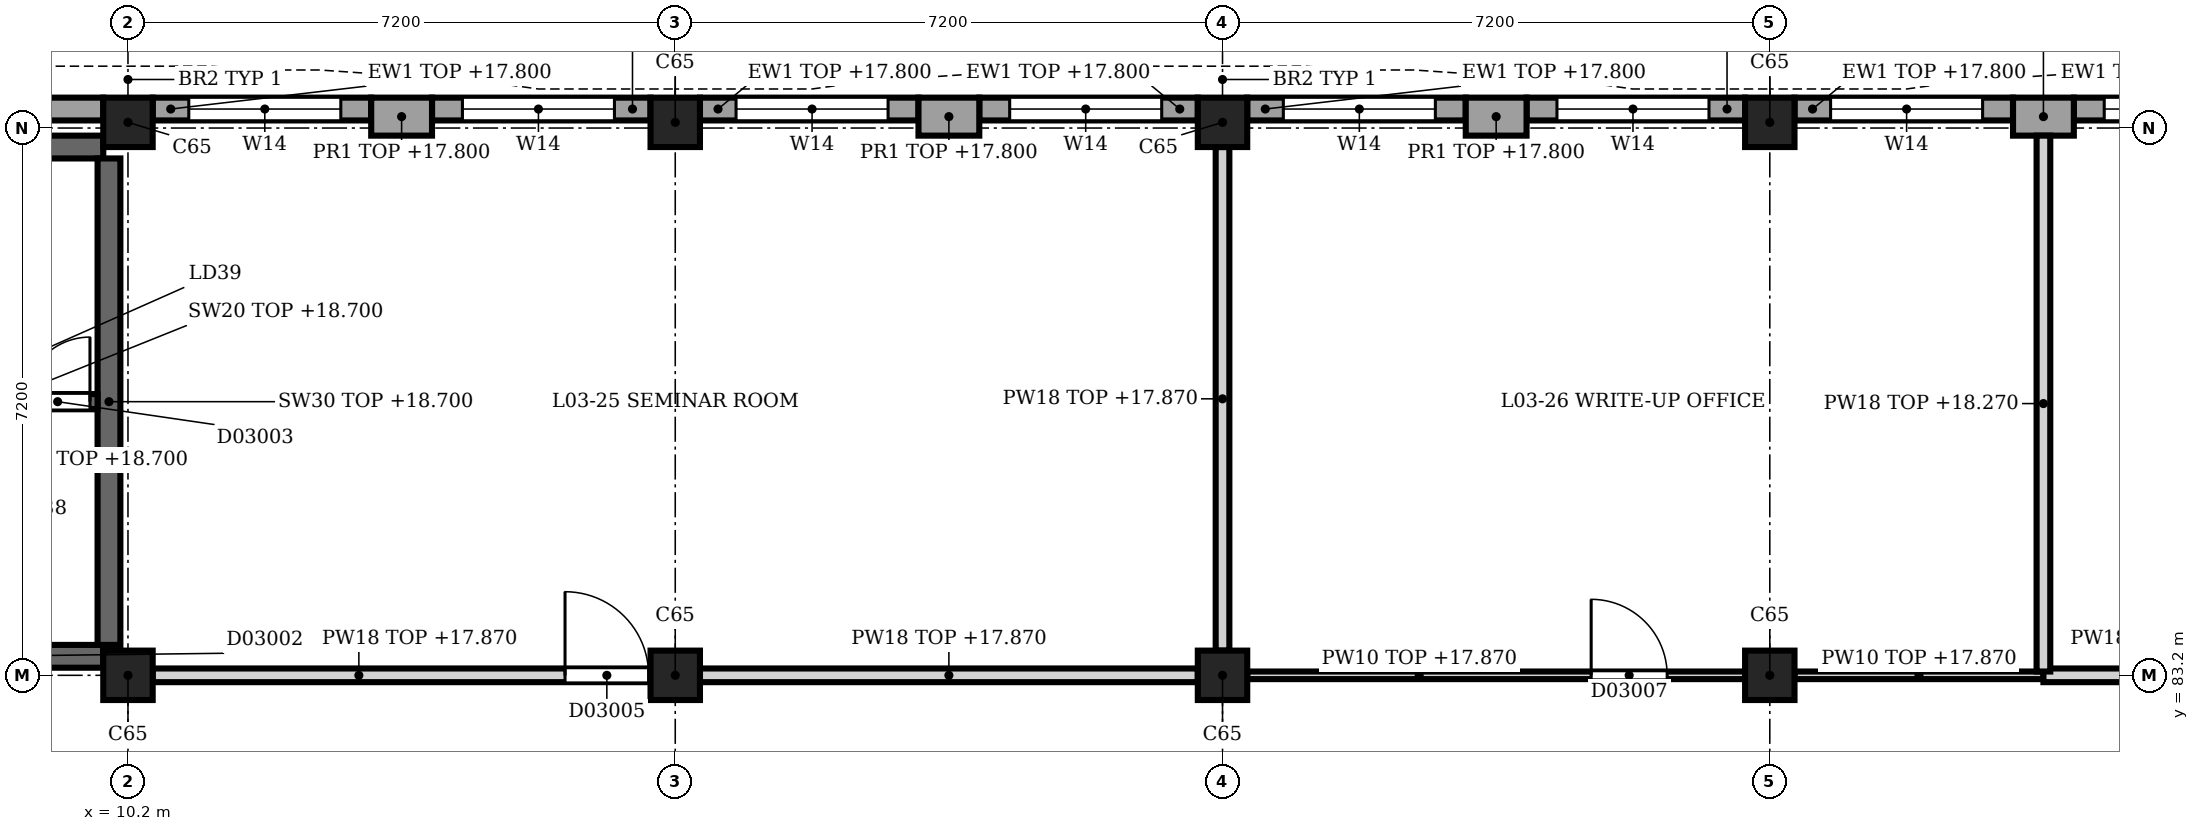
"""IFC4 building model, lengths in metres.
Left out: names, types, materials, properties, quantities, classifications, styles, units other than length and angle.
Written with IfcOpenShell. Run it as: python <this file> out.ifc"""

import sys

from ifc_helpers import new_model, si_unit, direction, frame, frame_2d, origin, origin_2d, place, context, subcontext, project, spatial, rectangle, extrude, element, fill, save


model = new_model("IFC4")
c1 = context("Model", 3, precision=1e-05, world=origin(), true_north=direction((0.0, 1.0)))
c2 = subcontext(c1, "Body", "Model", "MODEL_VIEW")
j1 = project(units=[si_unit("LENGTHUNIT", "METRE"), si_unit("PLANEANGLEUNIT", "RADIAN")], contexts=[c1])
p1 = place(None, origin())
s1 = spatial("IfcSite", under=j1, at=p1, CompositionType="ELEMENT")
p2 = place(p1, origin())
s2 = spatial("IfcBuilding", under=s1, at=p2, CompositionType="ELEMENT")
p3 = place(p2, frame((0.0, 0.0, 14.4)))
s3 = spatial("IfcBuildingStorey", under=s2, at=p3, CompositionType="ELEMENT", Elevation=14.4)
for number, where, z_axis, x_axis in (
    (1, (10.2, 83.2, 0.0), (0.0, 0.0, 1.0), (1.0, 0.0, 0.0)),
    (2, (10.2, 90.475, 0.0), (0.0, 0.0, 1.0), (1.0, 0.0, 0.0)),
    (3, (17.4, 83.2, 0.0), (0.0, 0.0, 1.0), (1.0, 0.0, 0.0)),
    (4, (17.4, 90.475, 0.0), (0.0, 0.0, 1.0), (1.0, 0.0, 0.0)),
    (5, (24.6, 83.2, 0.0), (0.0, 0.0, 1.0), (1.0, 0.0, 0.0)),
    (6, (24.6, 90.475, 0.0), (0.0, 0.0, 1.0), (1.0, 0.0, 0.0)),
    (7, (31.8, 83.2, 0.0), (0.0, 0.0, 1.0), (1.0, 0.0, 0.0)),
    (8, (31.8, 90.475, 0.0), (0.0, 0.0, 1.0), (1.0, 0.0, 0.0)),
):
    element("IfcColumn", number, at=place(p3, frame(where, z_axis=z_axis, x_axis=x_axis)), inside=s3, PredefinedType="COLUMN", context=c2, shape_type="SweptSolid", body=[
        extrude(rectangle(XDim=0.65, YDim=0.65, at=origin_2d()), origin(), (0.0, 0.0, 1.0), 4.5),
    ])
p4 = place(p3, frame((13.4, 90.55, 0.0), z_axis=(0.0, 0.0, 1.0), x_axis=(1.0, 0.0, 0.0)))
e9 = element("IfcWall", 9, at=p4, inside=s3, PredefinedType="SOLIDWALL", context=c2, shape_type="SweptSolid", body=[
    extrude(rectangle(XDim=0.8, YDim=0.5, at=frame_2d((0.4, 0.0))), origin(), (0.0, 0.0, 1.0), 3.4),
])
p5 = place(p3, frame((20.6, 90.55, 0.0), z_axis=(0.0, 0.0, 1.0), x_axis=(1.0, 0.0, 0.0)))
e10 = element("IfcWall", 10, at=p5, inside=s3, PredefinedType="SOLIDWALL", context=c2, shape_type="SweptSolid", body=[
    extrude(rectangle(XDim=0.8, YDim=0.5, at=frame_2d((0.4, 0.0))), origin(), (0.0, 0.0, 1.0), 3.4),
])
for number, where, z_axis, x_axis in (
    (11, (27.8, 90.55, 0.0), (0.0, 0.0, 1.0), (1.0, 0.0, 0.0)),
    (12, (35.0, 90.55, 0.0), (0.0, 0.0, 1.0), (1.0, 0.0, 0.0)),
):
    element("IfcWall", number, at=place(p3, frame(where, z_axis=z_axis, x_axis=x_axis)), inside=s3, PredefinedType="SOLIDWALL", context=c2, shape_type="SweptSolid", body=[
        extrude(rectangle(XDim=0.8, YDim=0.5, at=frame_2d((0.4, 0.0))), origin(), (0.0, 0.0, 1.0), 3.4),
    ])
p6 = place(p3, frame((7.0, 90.65, 0.0), z_axis=(0.0, 0.0, 1.0), x_axis=(1.0, 0.0, 0.0)))
e13 = element("IfcWall", 13, at=p6, inside=s3, PredefinedType="SOLIDWALL", context=c2, shape_type="SweptSolid", body=[
    extrude(rectangle(XDim=2.875, YDim=0.3, at=frame_2d((1.438, 0.0))), origin(), (0.0, 0.0, 1.0), 3.4),
])
p7 = place(p3, frame((10.525, 90.65, 0.0), z_axis=(0.0, 0.0, 1.0), x_axis=(1.0, 0.0, 0.0)))
e14 = element("IfcWall", 14, at=p7, inside=s3, PredefinedType="SOLIDWALL", context=c2, shape_type="SweptSolid", body=[
    extrude(rectangle(XDim=2.875, YDim=0.3, at=frame_2d((1.438, 0.0))), origin(), (0.0, 0.0, 1.0), 3.4),
])
p8 = place(p7, frame((0.475, 0.0, 0.9)))
e15 = element("IfcOpeningElement", 15, at=p8, cuts=e14, PredefinedType="OPENING", context=c2, shape_type="SweptSolid", body=[
    extrude(rectangle(XDim=2.0, YDim=2.4, at=frame_2d((1.0, 1.2))), frame((0.0, 0.16, 0.0), z_axis=(0.0, -1.0, 0.0), x_axis=(1.0, 0.0, 0.0)), (0.0, 0.0, 1.0), 0.32),
])
p9 = place(p3, frame((14.2, 90.65, 0.0), z_axis=(0.0, 0.0, 1.0), x_axis=(1.0, 0.0, 0.0)))
e16 = element("IfcWall", 16, at=p9, inside=s3, PredefinedType="SOLIDWALL", context=c2, shape_type="SweptSolid", body=[
    extrude(rectangle(XDim=2.875, YDim=0.3, at=frame_2d((1.438, 0.0))), origin(), (0.0, 0.0, 1.0), 3.4),
])
p10 = place(p9, frame((0.4, 0.0, 0.9)))
e17 = element("IfcOpeningElement", 17, at=p10, cuts=e16, PredefinedType="OPENING", context=c2, shape_type="SweptSolid", body=[
    extrude(rectangle(XDim=2.0, YDim=2.4, at=frame_2d((1.0, 1.2))), frame((0.0, 0.16, 0.0), z_axis=(0.0, -1.0, 0.0), x_axis=(1.0, 0.0, 0.0)), (0.0, 0.0, 1.0), 0.32),
])
p11 = place(p3, frame((17.725, 90.65, 0.0), z_axis=(0.0, 0.0, 1.0), x_axis=(1.0, 0.0, 0.0)))
e18 = element("IfcWall", 18, at=p11, inside=s3, PredefinedType="SOLIDWALL", context=c2, shape_type="SweptSolid", body=[
    extrude(rectangle(XDim=2.875, YDim=0.3, at=frame_2d((1.438, 0.0))), origin(), (0.0, 0.0, 1.0), 3.4),
])
p12 = place(p11, frame((0.475, 0.0, 0.9)))
e19 = element("IfcOpeningElement", 19, at=p12, cuts=e18, PredefinedType="OPENING", context=c2, shape_type="SweptSolid", body=[
    extrude(rectangle(XDim=2.0, YDim=2.4, at=frame_2d((1.0, 1.2))), frame((0.0, 0.16, 0.0), z_axis=(0.0, -1.0, 0.0), x_axis=(1.0, 0.0, 0.0)), (0.0, 0.0, 1.0), 0.32),
])
p13 = place(p3, frame((21.4, 90.65, 0.0), z_axis=(0.0, 0.0, 1.0), x_axis=(1.0, 0.0, 0.0)))
e20 = element("IfcWall", 20, at=p13, inside=s3, PredefinedType="SOLIDWALL", context=c2, shape_type="SweptSolid", body=[
    extrude(rectangle(XDim=2.875, YDim=0.3, at=frame_2d((1.438, 0.0))), origin(), (0.0, 0.0, 1.0), 3.4),
])
p14 = place(p13, frame((0.4, 0.0, 0.9)))
e21 = element("IfcOpeningElement", 21, at=p14, cuts=e20, PredefinedType="OPENING", context=c2, shape_type="SweptSolid", body=[
    extrude(rectangle(XDim=2.0, YDim=2.4, at=frame_2d((1.0, 1.2))), frame((0.0, 0.16, 0.0), z_axis=(0.0, -1.0, 0.0), x_axis=(1.0, 0.0, 0.0)), (0.0, 0.0, 1.0), 0.32),
])
p15 = place(p3, frame((24.925, 90.65, 0.0), z_axis=(0.0, 0.0, 1.0), x_axis=(1.0, 0.0, 0.0)))
e22 = element("IfcWall", 22, at=p15, inside=s3, PredefinedType="SOLIDWALL", context=c2, shape_type="SweptSolid", body=[
    extrude(rectangle(XDim=2.875, YDim=0.3, at=frame_2d((1.438, 0.0))), origin(), (0.0, 0.0, 1.0), 3.4),
])
p16 = place(p15, frame((0.475, 0.0, 0.9)))
e23 = element("IfcOpeningElement", 23, at=p16, cuts=e22, PredefinedType="OPENING", context=c2, shape_type="SweptSolid", body=[
    extrude(rectangle(XDim=2.0, YDim=2.4, at=frame_2d((1.0, 1.2))), frame((0.0, 0.16, 0.0), z_axis=(0.0, -1.0, 0.0), x_axis=(1.0, 0.0, 0.0)), (0.0, 0.0, 1.0), 0.32),
])
p17 = place(p3, frame((28.6, 90.65, 0.0), z_axis=(0.0, 0.0, 1.0), x_axis=(1.0, 0.0, 0.0)))
e24 = element("IfcWall", 24, at=p17, inside=s3, PredefinedType="SOLIDWALL", context=c2, shape_type="SweptSolid", body=[
    extrude(rectangle(XDim=2.875, YDim=0.3, at=frame_2d((1.438, 0.0))), origin(), (0.0, 0.0, 1.0), 3.4),
])
p18 = place(p17, frame((0.4, 0.0, 0.9)))
e25 = element("IfcOpeningElement", 25, at=p18, cuts=e24, PredefinedType="OPENING", context=c2, shape_type="SweptSolid", body=[
    extrude(rectangle(XDim=2.0, YDim=2.4, at=frame_2d((1.0, 1.2))), frame((0.0, 0.16, 0.0), z_axis=(0.0, -1.0, 0.0), x_axis=(1.0, 0.0, 0.0)), (0.0, 0.0, 1.0), 0.32),
])
p19 = place(p3, frame((32.125, 90.65, 0.0), z_axis=(0.0, 0.0, 1.0), x_axis=(1.0, 0.0, 0.0)))
e26 = element("IfcWall", 26, at=p19, inside=s3, PredefinedType="SOLIDWALL", context=c2, shape_type="SweptSolid", body=[
    extrude(rectangle(XDim=2.875, YDim=0.3, at=frame_2d((1.438, 0.0))), origin(), (0.0, 0.0, 1.0), 3.4),
])
p20 = place(p19, frame((0.475, 0.0, 0.9)))
e27 = element("IfcOpeningElement", 27, at=p20, cuts=e26, PredefinedType="OPENING", context=c2, shape_type="SweptSolid", body=[
    extrude(rectangle(XDim=2.0, YDim=2.4, at=frame_2d((1.0, 1.2))), frame((0.0, 0.16, 0.0), z_axis=(0.0, -1.0, 0.0), x_axis=(1.0, 0.0, 0.0)), (0.0, 0.0, 1.0), 0.32),
])
p21 = place(p3, frame((35.8, 90.65, 0.0), z_axis=(0.0, 0.0, 1.0), x_axis=(1.0, 0.0, 0.0)))
e28 = element("IfcWall", 28, at=p21, inside=s3, PredefinedType="SOLIDWALL", context=c2, shape_type="SweptSolid", body=[
    extrude(rectangle(XDim=2.875, YDim=0.3, at=frame_2d((1.438, 0.0))), origin(), (0.0, 0.0, 1.0), 3.4),
])
p22 = place(p21, frame((0.4, 0.0, 0.9)))
e29 = element("IfcOpeningElement", 29, at=p22, cuts=e28, PredefinedType="OPENING", context=c2, shape_type="SweptSolid", body=[
    extrude(rectangle(XDim=2.0, YDim=2.4, at=frame_2d((1.0, 1.2))), frame((0.0, 0.16, 0.0), z_axis=(0.0, -1.0, 0.0), x_axis=(1.0, 0.0, 0.0)), (0.0, 0.0, 1.0), 0.32),
])
p23 = place(p3, frame((3.25, 83.45, 0.0), z_axis=(0.0, 0.0, 1.0), x_axis=(1.0, 0.0, 0.0)))
e30 = element("IfcWall", 30, at=p23, inside=s3, PredefinedType="SHEAR", context=c2, shape_type="SweptSolid", body=[
    extrude(rectangle(XDim=6.625, YDim=0.3, at=frame_2d((3.312, 0.0))), origin(), (0.0, 0.0, 1.0), 4.3),
])
p24 = place(p23, frame((4.35, 0.0, 0.0)))
e31 = element("IfcOpeningElement", 31, at=p24, cuts=e30, PredefinedType="OPENING", context=c2, shape_type="SweptSolid", body=[
    extrude(rectangle(XDim=1.2, YDim=2.1, at=frame_2d((0.6, 1.05))), frame((0.0, 0.16, 0.0), z_axis=(0.0, -1.0, 0.0), x_axis=(1.0, 0.0, 0.0)), (0.0, 0.0, 1.0), 0.32),
])
p25 = place(p3, frame((3.25, 90.15, 0.0), z_axis=(0.0, 0.0, 1.0), x_axis=(1.0, 0.0, 0.0)))
e32 = element("IfcWall", 32, at=p25, inside=s3, PredefinedType="SHEAR", context=c2, shape_type="SweptSolid", body=[
    extrude(rectangle(XDim=6.625, YDim=0.3, at=frame_2d((3.312, 0.0))), origin(), (0.0, 0.0, 1.0), 4.3),
])
p26 = place(p25, frame((1.25, 0.0, 1.2)))
e33 = element("IfcOpeningElement", 33, at=p26, cuts=e32, PredefinedType="OPENING", context=c2, shape_type="SweptSolid", body=[
    extrude(rectangle(XDim=0.6, YDim=1.8, at=frame_2d((0.3, 0.9))), frame((0.0, 0.16, 0.0), z_axis=(0.0, -1.0, 0.0), x_axis=(1.0, 0.0, 0.0)), (0.0, 0.0, 1.0), 0.32),
])
p27 = place(p3, frame((9.95, 83.6, 0.0), z_axis=(0.0, 0.0, 1.0), x_axis=(0.0, 1.0, 0.0)))
e34 = element("IfcWall", 34, at=p27, inside=s3, PredefinedType="SHEAR", context=c2, shape_type="SweptSolid", body=[
    extrude(rectangle(XDim=6.4, YDim=0.3, at=frame_2d((3.2, 0.0))), origin(), (0.0, 0.0, 1.0), 4.3),
])
p28 = place(p3, frame((9.8, 86.8, 0.0), z_axis=(0.0, 0.0, 1.0), x_axis=(-1.0, 0.0, 0.0)))
e35 = element("IfcWall", 35, at=p28, inside=s3, PredefinedType="SHEAR", context=c2, shape_type="SweptSolid", body=[
    extrude(rectangle(XDim=3.25, YDim=0.2, at=frame_2d((1.625, 0.0))), origin(), (0.0, 0.0, 1.0), 4.3),
])
p29 = place(p28, frame((1.7, 0.0, 0.0)))
e36 = element("IfcOpeningElement", 36, at=p29, cuts=e35, PredefinedType="OPENING", context=c2, shape_type="SweptSolid", body=[
    extrude(rectangle(XDim=1.1, YDim=2.1, at=frame_2d((0.55, 1.05))), frame((0.0, 0.11, 0.0), z_axis=(0.0, -1.0, 0.0), x_axis=(1.0, 0.0, 0.0)), (0.0, 0.0, 1.0), 0.22),
])
p30 = place(p28, frame((0.1, 0.0, 0.0)))
e37 = element("IfcOpeningElement", 37, at=p30, cuts=e35, PredefinedType="OPENING", context=c2, shape_type="SweptSolid", body=[
    extrude(rectangle(XDim=0.85, YDim=2.1, at=frame_2d((0.425, 1.05))), frame((0.0, 0.11, 0.0), z_axis=(0.0, -1.0, 0.0), x_axis=(1.0, 0.0, 0.0)), (0.0, 0.0, 1.0), 0.22),
])
p31 = place(p3, frame((10.525, 83.2, 0.0), z_axis=(0.0, 0.0, 1.0), x_axis=(1.0, 0.0, 0.0)))
e38 = element("IfcWall", 38, at=p31, inside=s3, PredefinedType="PARTITIONING", context=c2, shape_type="SweptSolid", body=[
    extrude(rectangle(XDim=6.55, YDim=0.18, at=frame_2d((3.275, 0.0))), origin(), (0.0, 0.0, 1.0), 3.47),
])
p32 = place(p31, frame((5.425, 0.0, 0.0)))
e39 = element("IfcOpeningElement", 39, at=p32, cuts=e38, PredefinedType="OPENING", context=c2, shape_type="SweptSolid", body=[
    extrude(rectangle(XDim=1.1, YDim=2.3, at=frame_2d((0.55, 1.15))), frame((0.0, 0.1, 0.0), z_axis=(0.0, -1.0, 0.0), x_axis=(1.0, 0.0, 0.0)), (0.0, 0.0, 1.0), 0.2),
])
p33 = place(p3, frame((17.725, 83.2, 0.0), z_axis=(0.0, 0.0, 1.0), x_axis=(1.0, 0.0, 0.0)))
e40 = element("IfcWall", 40, at=p33, inside=s3, PredefinedType="PARTITIONING", context=c2, shape_type="SweptSolid", body=[
    extrude(rectangle(XDim=6.55, YDim=0.18, at=frame_2d((3.275, 0.0))), origin(), (0.0, 0.0, 1.0), 3.47),
])
p34 = place(p3, frame((24.925, 83.2, 0.0), z_axis=(0.0, 0.0, 1.0), x_axis=(1.0, 0.0, 0.0)))
e41 = element("IfcWall", 41, at=p34, inside=s3, PredefinedType="PARTITIONING", context=c2, shape_type="SweptSolid", body=[
    extrude(rectangle(XDim=6.55, YDim=0.1, at=frame_2d((3.275, 0.0))), origin(), (0.0, 0.0, 1.0), 3.47),
])
p35 = place(p34, frame((4.525, 0.0, 0.0)))
e42 = element("IfcOpeningElement", 42, at=p35, cuts=e41, PredefinedType="OPENING", context=c2, shape_type="SweptSolid", body=[
    extrude(rectangle(XDim=1.0, YDim=2.1, at=frame_2d((0.5, 1.05))), frame((0.0, 0.06, 0.0), z_axis=(0.0, -1.0, 0.0), x_axis=(1.0, 0.0, 0.0)), (0.0, 0.0, 1.0), 0.12),
])
p36 = place(p3, frame((32.125, 83.2, 0.0), z_axis=(0.0, 0.0, 1.0), x_axis=(1.0, 0.0, 0.0)))
e43 = element("IfcWall", 43, at=p36, inside=s3, PredefinedType="PARTITIONING", context=c2, shape_type="SweptSolid", body=[
    extrude(rectangle(XDim=3.275, YDim=0.1, at=frame_2d((1.637, 0.0))), origin(), (0.0, 0.0, 1.0), 3.47),
])
p37 = place(p3, frame((35.4, 83.2, 0.0), z_axis=(0.0, 0.0, 1.0), x_axis=(1.0, 0.0, 0.0)))
e44 = element("IfcWall", 44, at=p37, inside=s3, PredefinedType="PARTITIONING", context=c2, shape_type="SweptSolid", body=[
    extrude(rectangle(XDim=3.275, YDim=0.18, at=frame_2d((1.638, 0.0))), origin(), (0.0, 0.0, 1.0), 3.47),
])
p38 = place(p3, frame((24.6, 83.525, 0.0), z_axis=(0.0, 0.0, 1.0), x_axis=(0.0, 1.0, 0.0)))
e45 = element("IfcWall", 45, at=p38, inside=s3, PredefinedType="PARTITIONING", context=c2, shape_type="SweptSolid", body=[
    extrude(rectangle(XDim=6.625, YDim=0.18, at=frame_2d((3.312, 0.0))), origin(), (0.0, 0.0, 1.0), 3.47),
])
p39 = place(p3, frame((35.4, 83.25, 0.0), z_axis=(0.0, 0.0, 1.0), x_axis=(0.0, 1.0, 0.0)))
e46 = element("IfcWall", 46, at=p39, inside=s3, PredefinedType="PARTITIONING", context=c2, shape_type="SweptSolid", body=[
    extrude(rectangle(XDim=7.05, YDim=0.18, at=frame_2d((3.525, 0.0))), origin(), (0.0, 0.0, 1.0), 3.87),
])
p40 = place(p8, origin())
e47 = element("IfcWindow", 47, at=p40, inside=s3, PartitioningType="SINGLE_PANEL", PredefinedType="WINDOW", context=c2, shape_type="SweptSolid", body=[
    extrude(rectangle(XDim=2.0, YDim=2.4, at=frame_2d((1.0, 1.2))), frame((0.0, 0.03, 0.0), z_axis=(0.0, -1.0, 0.0), x_axis=(1.0, 0.0, 0.0)), (0.0, 0.0, 1.0), 0.06),
])
fill(e15, e47)
p41 = place(p10, origin())
e48 = element("IfcWindow", 48, at=p41, inside=s3, PartitioningType="SINGLE_PANEL", PredefinedType="WINDOW", context=c2, shape_type="SweptSolid", body=[
    extrude(rectangle(XDim=2.0, YDim=2.4, at=frame_2d((1.0, 1.2))), frame((0.0, 0.03, 0.0), z_axis=(0.0, -1.0, 0.0), x_axis=(1.0, 0.0, 0.0)), (0.0, 0.0, 1.0), 0.06),
])
fill(e17, e48)
p42 = place(p12, origin())
e49 = element("IfcWindow", 49, at=p42, inside=s3, PartitioningType="SINGLE_PANEL", PredefinedType="WINDOW", context=c2, shape_type="SweptSolid", body=[
    extrude(rectangle(XDim=2.0, YDim=2.4, at=frame_2d((1.0, 1.2))), frame((0.0, 0.03, 0.0), z_axis=(0.0, -1.0, 0.0), x_axis=(1.0, 0.0, 0.0)), (0.0, 0.0, 1.0), 0.06),
])
fill(e19, e49)
p43 = place(p14, origin())
e50 = element("IfcWindow", 50, at=p43, inside=s3, PartitioningType="SINGLE_PANEL", PredefinedType="WINDOW", context=c2, shape_type="SweptSolid", body=[
    extrude(rectangle(XDim=2.0, YDim=2.4, at=frame_2d((1.0, 1.2))), frame((0.0, 0.03, 0.0), z_axis=(0.0, -1.0, 0.0), x_axis=(1.0, 0.0, 0.0)), (0.0, 0.0, 1.0), 0.06),
])
fill(e21, e50)
p44 = place(p16, origin())
e51 = element("IfcWindow", 51, at=p44, inside=s3, PartitioningType="SINGLE_PANEL", PredefinedType="WINDOW", context=c2, shape_type="SweptSolid", body=[
    extrude(rectangle(XDim=2.0, YDim=2.4, at=frame_2d((1.0, 1.2))), frame((0.0, 0.03, 0.0), z_axis=(0.0, -1.0, 0.0), x_axis=(1.0, 0.0, 0.0)), (0.0, 0.0, 1.0), 0.06),
])
fill(e23, e51)
p45 = place(p18, origin())
e52 = element("IfcWindow", 52, at=p45, inside=s3, PartitioningType="SINGLE_PANEL", PredefinedType="WINDOW", context=c2, shape_type="SweptSolid", body=[
    extrude(rectangle(XDim=2.0, YDim=2.4, at=frame_2d((1.0, 1.2))), frame((0.0, 0.03, 0.0), z_axis=(0.0, -1.0, 0.0), x_axis=(1.0, 0.0, 0.0)), (0.0, 0.0, 1.0), 0.06),
])
fill(e25, e52)
p46 = place(p20, origin())
e53 = element("IfcWindow", 53, at=p46, inside=s3, PartitioningType="SINGLE_PANEL", PredefinedType="WINDOW", context=c2, shape_type="SweptSolid", body=[
    extrude(rectangle(XDim=2.0, YDim=2.4, at=frame_2d((1.0, 1.2))), frame((0.0, 0.03, 0.0), z_axis=(0.0, -1.0, 0.0), x_axis=(1.0, 0.0, 0.0)), (0.0, 0.0, 1.0), 0.06),
])
fill(e27, e53)
p47 = place(p22, origin())
e54 = element("IfcWindow", 54, at=p47, inside=s3, PartitioningType="SINGLE_PANEL", PredefinedType="WINDOW", context=c2, shape_type="SweptSolid", body=[
    extrude(rectangle(XDim=2.0, YDim=2.4, at=frame_2d((1.0, 1.2))), frame((0.0, 0.03, 0.0), z_axis=(0.0, -1.0, 0.0), x_axis=(1.0, 0.0, 0.0)), (0.0, 0.0, 1.0), 0.06),
])
fill(e29, e54)
p48 = place(p30, origin())
e55 = element("IfcDoor", 55, at=p48, inside=s3, OperationType="SINGLE_SWING_LEFT", PredefinedType="DOOR", context=c2, shape_type="SweptSolid", body=[
    extrude(rectangle(XDim=0.85, YDim=2.1, at=frame_2d((0.425, 1.05))), frame((0.0, 0.025, 0.0), z_axis=(0.0, -1.0, 0.0), x_axis=(1.0, 0.0, 0.0)), (0.0, 0.0, 1.0), 0.05),
])
fill(e37, e55)
p49 = place(p32, origin())
e56 = element("IfcDoor", 56, at=p49, inside=s3, OperationType="SINGLE_SWING_RIGHT", PredefinedType="DOOR", context=c2, shape_type="SweptSolid", body=[
    extrude(rectangle(XDim=1.1, YDim=2.3, at=frame_2d((0.55, 1.15))), frame((0.0, 0.025, 0.0), z_axis=(0.0, -1.0, 0.0), x_axis=(1.0, 0.0, 0.0)), (0.0, 0.0, 1.0), 0.05),
])
fill(e39, e56)
p50 = place(p35, origin())
e57 = element("IfcDoor", 57, at=p50, inside=s3, OperationType="SINGLE_SWING_RIGHT", PredefinedType="DOOR", context=c2, shape_type="SweptSolid", body=[
    extrude(rectangle(XDim=1.0, YDim=2.1, at=frame_2d((0.5, 1.05))), frame((0.0, 0.025, 0.0), z_axis=(0.0, -1.0, 0.0), x_axis=(1.0, 0.0, 0.0)), (0.0, 0.0, 1.0), 0.05),
])
fill(e42, e57)
save(model, sys.argv[1])
